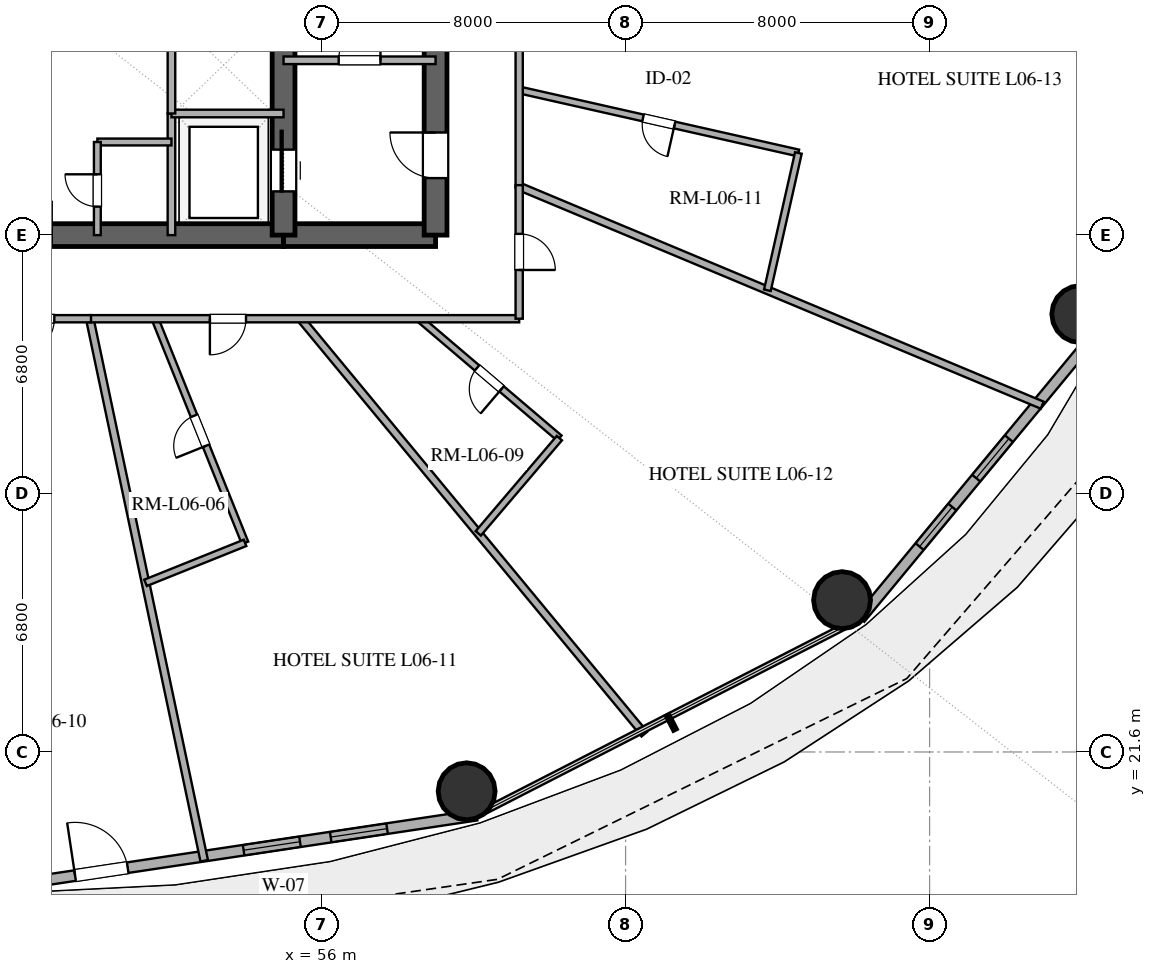
"""IFC4 building model, lengths in metres.
Left out: names, types, materials, properties, quantities, classifications, styles, units other than length and angle.
Written with IfcOpenShell. Run it as: python <this file> out.ifc"""

import sys

from ifc_helpers import new_model, si_unit, direction, frame, frame_2d, origin, origin_2d, place, context, subcontext, project, spatial, rectangle, hollow_circle, extrude, element, fill, save


model = new_model("IFC4")
c1 = context("Model", 3, precision=1e-05, world=origin(), true_north=direction((0.0, 1.0)))
c2 = subcontext(c1, "Body", "Model", "MODEL_VIEW")
j1 = project(units=[si_unit("LENGTHUNIT", "METRE"), si_unit("PLANEANGLEUNIT", "RADIAN")], contexts=[c1])
p1 = place(None, origin())
s1 = spatial("IfcSite", under=j1, at=p1, CompositionType="ELEMENT")
p2 = place(p1, origin())
s2 = spatial("IfcBuilding", under=s1, at=p2, CompositionType="ELEMENT")
p3 = place(p2, frame((0.0, 0.0, 31.8)))
s3 = spatial("IfcBuildingStorey", under=s2, at=p3, CompositionType="ELEMENT", Elevation=31.8)
p4 = place(p3, frame((41.0, 35.2, 0.0), z_axis=(0.0, 0.0, 1.0), x_axis=(1.0, 0.0, 0.0)))
e1 = element("IfcWall", 1, at=p4, inside=s3, PredefinedType="SHEAR", context=c2, shape_type="SweptSolid", body=[
    extrude(rectangle(XDim=14.0, YDim=0.6, at=frame_2d((7.0, 0.0))), origin(), (0.0, 0.0, 1.0), 3.38),
])
p5 = place(p4, frame((6.1, 0.0, 0.0)))
e2 = element("IfcOpeningElement", 2, at=p5, cuts=e1, PredefinedType="OPENING", context=c2, shape_type="SweptSolid", body=[
    extrude(rectangle(XDim=1.8, YDim=2.25, at=frame_2d((0.9, 1.125))), frame((0.0, 0.31, 0.0), z_axis=(0.0, -1.0, 0.0), x_axis=(1.0, 0.0, 0.0)), (0.0, 0.0, 1.0), 0.62),
])
p6 = place(p3, frame((55.0, 35.2, 0.0), z_axis=(0.0, 0.0, 1.0), x_axis=(1.0, 0.0, 0.0)))
e3 = element("IfcWall", 3, at=p6, inside=s3, PredefinedType="SHEAR", context=c2, shape_type="SweptSolid", body=[
    extrude(rectangle(XDim=4.0, YDim=0.6, at=frame_2d((2.0, 0.0))), origin(), (0.0, 0.0, 1.0), 3.38),
])
p7 = place(p3, frame((59.0, 35.2, 0.0), z_axis=(0.0, 0.0, 1.0), x_axis=(0.0, 1.0, 0.0)))
e4 = element("IfcWall", 4, at=p7, inside=s3, PredefinedType="SHEAR", context=c2, shape_type="SweptSolid", body=[
    extrude(rectangle(XDim=13.6, YDim=0.6, at=frame_2d((6.8, 0.0))), origin(), (0.0, 0.0, 1.0), 3.38),
])
p8 = place(p7, frame((1.5, 0.0, 0.0)))
e5 = element("IfcOpeningElement", 5, at=p8, cuts=e4, PredefinedType="OPENING", context=c2, shape_type="SweptSolid", body=[
    extrude(rectangle(XDim=1.2, YDim=2.15, at=frame_2d((0.6, 1.075))), frame((0.0, 0.31, 0.0), z_axis=(0.0, -1.0, 0.0), x_axis=(1.0, 0.0, 0.0)), (0.0, 0.0, 1.0), 0.62),
])
p9 = place(p3, frame((55.0, 35.2, 0.0), z_axis=(0.0, 0.0, 1.0), x_axis=(0.0, 1.0, 0.0)))
e6 = element("IfcWall", 6, at=p9, inside=s3, PredefinedType="SHEAR", context=c2, shape_type="SweptSolid", body=[
    extrude(rectangle(XDim=13.6, YDim=0.6, at=frame_2d((6.8, 0.0))), origin(), (0.0, 0.0, 1.0), 3.38),
])
p10 = place(p9, frame((1.15, 0.0, 0.0)))
e7 = element("IfcOpeningElement", 7, at=p10, cuts=e6, PredefinedType="OPENING", context=c2, shape_type="SweptSolid", body=[
    extrude(rectangle(XDim=1.1, YDim=2.2, at=frame_2d((0.55, 1.1))), frame((0.0, 0.31, 0.0), z_axis=(0.0, -1.0, 0.0), x_axis=(1.0, 0.0, 0.0)), (0.0, 0.0, 1.0), 0.62),
])
for number, where, z_axis, x_axis in (
    (8, (59.818, 20.566, 0.0), (0.0, 0.0, 1.0), (1.0, 0.0, 0.0)),
    (9, (69.697, 25.595, 0.0), (0.0, 0.0, 1.0), (1.0, 0.0, 0.0)),
    (10, (75.966, 33.122, 0.0), (0.0, 0.0, 1.0), (1.0, 0.0, 0.0)),
):
    element("IfcColumn", number, at=place(p3, frame(where, z_axis=z_axis, x_axis=x_axis)), inside=s3, PredefinedType="COLUMN", context=c2, shape_type="SweptSolid", body=[
        extrude(hollow_circle(Radius=0.75, WallThickness=0.04, at=origin_2d()), origin(), (0.0, 0.0, 1.0), 3.38),
    ])
p11 = place(p3, frame((48.0, 18.12, 0.0), z_axis=(0.0, 0.0, 1.0), x_axis=(0.988864835849, 0.148816452121, 0.0)))
e11 = element("IfcWall", 11, at=p11, inside=s3, PredefinedType="SOLIDWALL", context=c2, shape_type="SweptSolid", body=[
    extrude(rectangle(XDim=12.214, YDim=0.28, at=frame_2d((6.107, 0.0))), origin(), (0.0, 0.0, 1.0), 3.38),
])
p12 = place(p11, frame((1.531, 0.0, 0.0)))
e12 = element("IfcOpeningElement", 12, at=p12, cuts=e11, PredefinedType="OPENING", context=c2, shape_type="SweptSolid", body=[
    extrude(rectangle(XDim=1.4, YDim=2.2, at=frame_2d((0.7, 1.1))), frame((0.0, 0.15, 0.0), z_axis=(0.0, -1.0, 0.0), x_axis=(1.0, 0.0, 0.0)), (0.0, 0.0, 1.0), 0.3),
])
p13 = place(p11, frame((6.016, 0.0, 0.85)))
e13 = element("IfcOpeningElement", 13, at=p13, cuts=e11, PredefinedType="OPENING", context=c2, shape_type="SweptSolid", body=[
    extrude(rectangle(XDim=1.5, YDim=1.8, at=frame_2d((0.75, 0.9))), frame((0.0, 0.15, 0.0), z_axis=(0.0, -1.0, 0.0), x_axis=(1.0, 0.0, 0.0)), (0.0, 0.0, 1.0), 0.3),
])
p14 = place(p11, frame((8.333, 0.0, 0.85)))
e14 = element("IfcOpeningElement", 14, at=p14, cuts=e11, PredefinedType="OPENING", context=c2, shape_type="SweptSolid", body=[
    extrude(rectangle(XDim=1.5, YDim=1.8, at=frame_2d((0.75, 0.9))), frame((0.0, 0.15, 0.0), z_axis=(0.0, -1.0, 0.0), x_axis=(1.0, 0.0, 0.0)), (0.0, 0.0, 1.0), 0.3),
])
p15 = place(p3, frame((70.174, 25.114, 0.0), z_axis=(0.0, 0.0, 1.0), x_axis=(0.637296809613, 0.770618437657, 0.0)))
e15 = element("IfcWall", 15, at=p15, inside=s3, PredefinedType="SOLIDWALL", context=c2, shape_type="SweptSolid", body=[
    extrude(rectangle(XDim=10.053, YDim=0.28, at=frame_2d((5.027, 0.0))), origin(), (0.0, 0.0, 1.0), 3.38),
])
p16 = place(p15, frame((2.453, 0.0, 0.85)))
e16 = element("IfcOpeningElement", 16, at=p16, cuts=e15, PredefinedType="OPENING", context=c2, shape_type="SweptSolid", body=[
    extrude(rectangle(XDim=1.35, YDim=1.8, at=frame_2d((0.675, 0.9))), frame((0.0, 0.15, 0.0), z_axis=(0.0, -1.0, 0.0), x_axis=(1.0, 0.0, 0.0)), (0.0, 0.0, 1.0), 0.3),
])
p17 = place(p15, frame((4.789, 0.0, 0.85)))
e17 = element("IfcOpeningElement", 17, at=p17, cuts=e15, PredefinedType="OPENING", context=c2, shape_type="SweptSolid", body=[
    extrude(rectangle(XDim=1.35, YDim=1.8, at=frame_2d((0.675, 0.9))), frame((0.0, 0.15, 0.0), z_axis=(0.0, -1.0, 0.0), x_axis=(1.0, 0.0, 0.0)), (0.0, 0.0, 1.0), 0.3),
])
p18 = place(p3, frame((55.0, 39.8, 0.0), z_axis=(0.0, 0.0, 1.0), x_axis=(1.0, 0.0, 0.0)))
e18 = element("IfcWall", 18, at=p18, inside=s3, PredefinedType="SOLIDWALL", context=c2, shape_type="SweptSolid", body=[
    extrude(rectangle(XDim=4.0, YDim=0.2, at=frame_2d((2.0, 0.0))), origin(), (0.0, 0.0, 1.0), 2.74),
])
p19 = place(p18, frame((1.45, 0.0, 0.0)))
e19 = element("IfcOpeningElement", 19, at=p19, cuts=e18, PredefinedType="OPENING", context=c2, shape_type="SweptSolid", body=[
    extrude(rectangle(XDim=1.1, YDim=2.15, at=frame_2d((0.55, 1.075))), frame((0.0, 0.11, 0.0), z_axis=(0.0, -1.0, 0.0), x_axis=(1.0, 0.0, 0.0)), (0.0, 0.0, 1.0), 0.22),
])
p20 = place(p3, frame((52.05, 35.2, 0.0), z_axis=(0.0, 0.0, 1.0), x_axis=(0.0, 1.0, 0.0)))
e20 = element("IfcWall", 20, at=p20, inside=s3, PredefinedType="SOLIDWALL", context=c2, shape_type="SweptSolid", body=[
    extrude(rectangle(XDim=3.2, YDim=0.2, at=frame_2d((1.6, 0.0))), origin(), (0.0, 0.0, 1.0), 2.74),
])
p21 = place(p3, frame((52.05, 38.4, 0.0), z_axis=(0.0, 0.0, 1.0), x_axis=(1.0, 0.0, 0.0)))
e21 = element("IfcWall", 21, at=p21, inside=s3, PredefinedType="SOLIDWALL", context=c2, shape_type="SweptSolid", body=[
    extrude(rectangle(XDim=2.95, YDim=0.2, at=frame_2d((1.475, 0.0))), origin(), (0.0, 0.0, 1.0), 2.74),
])
p22 = place(p3, frame((52.05, 38.4, 0.0), z_axis=(0.0, 0.0, 1.0), x_axis=(0.0, 1.0, 0.0)))
e22 = element("IfcWall", 22, at=p22, inside=s3, PredefinedType="SOLIDWALL", context=c2, shape_type="SweptSolid", body=[
    extrude(rectangle(XDim=10.4, YDim=0.2, at=frame_2d((5.2, 0.0))), origin(), (0.0, 0.0, 1.0), 2.74),
])
p23 = place(p22, frame((8.2, 0.0, 0.0)))
e23 = element("IfcOpeningElement", 23, at=p23, cuts=e22, PredefinedType="OPENING", context=c2, shape_type="SweptSolid", body=[
    extrude(rectangle(XDim=1.2, YDim=2.2, at=frame_2d((0.6, 1.1))), frame((0.0, 0.11, 0.0), z_axis=(0.0, -1.0, 0.0), x_axis=(1.0, 0.0, 0.0)), (0.0, 0.0, 1.0), 0.22),
])
p24 = place(p3, frame((50.1, 37.65, 0.0), z_axis=(0.0, 0.0, 1.0), x_axis=(1.0, 0.0, 0.0)))
e24 = element("IfcWall", 24, at=p24, inside=s3, PredefinedType="PLUMBINGWALL", context=c2, shape_type="SweptSolid", body=[
    extrude(rectangle(XDim=1.95, YDim=0.18, at=frame_2d((0.975, 0.0))), origin(), (0.0, 0.0, 1.0), 2.74),
])
p25 = place(p3, frame((50.1, 35.2, 0.0), z_axis=(0.0, 0.0, 1.0), x_axis=(0.0, 1.0, 0.0)))
e25 = element("IfcWall", 25, at=p25, inside=s3, PredefinedType="PLUMBINGWALL", context=c2, shape_type="SweptSolid", body=[
    extrude(rectangle(XDim=2.45, YDim=0.18, at=frame_2d((1.225, 0.0))), origin(), (0.0, 0.0, 1.0), 2.74),
])
p26 = place(p25, frame((0.75, 0.0, 0.0)))
e26 = element("IfcOpeningElement", 26, at=p26, cuts=e25, PredefinedType="OPENING", context=c2, shape_type="SweptSolid", body=[
    extrude(rectangle(XDim=0.85, YDim=2.1, at=frame_2d((0.425, 1.05))), frame((0.0, 0.1, 0.0), z_axis=(0.0, -1.0, 0.0), x_axis=(1.0, 0.0, 0.0)), (0.0, 0.0, 1.0), 0.2),
])
p27 = place(p3, frame((61.2, 36.48, 0.0), z_axis=(0.0, 0.0, 1.0), x_axis=(0.922585702004, -0.385792201136, 0.0)))
e27 = element("IfcWall", 27, at=p27, inside=s3, PredefinedType="PARTITIONING", context=c2, shape_type="SweptSolid", body=[
    extrude(rectangle(XDim=14.918, YDim=0.2, at=frame_2d((7.459, 0.0))), origin(), (0.0, 0.0, 1.0), 2.74),
])
p28 = place(p3, frame((68.547, 37.361, 0.0), z_axis=(0.0, 0.0, 1.0), x_axis=(-0.975442349969, 0.220254902072, 0.0)))
e28 = element("IfcWall", 28, at=p28, inside=s3, PredefinedType="PLUMBINGWALL", context=c2, shape_type="SweptSolid", body=[
    extrude(rectangle(XDim=7.532, YDim=0.18, at=frame_2d((3.766, 0.0))), origin(), (0.0, 0.0, 1.0), 2.74),
])
p29 = place(p28, frame((3.341, 0.0, 0.0)))
e29 = element("IfcOpeningElement", 29, at=p29, cuts=e28, PredefinedType="OPENING", context=c2, shape_type="SweptSolid", body=[
    extrude(rectangle(XDim=0.85, YDim=2.1, at=frame_2d((0.425, 1.05))), frame((0.0, 0.1, 0.0), z_axis=(0.0, -1.0, 0.0), x_axis=(1.0, 0.0, 0.0)), (0.0, 0.0, 1.0), 0.2),
])
p30 = place(p3, frame((49.9, 33.0, 0.0), z_axis=(0.0, 0.0, 1.0), x_axis=(0.206598790959, -0.97842574556, 0.0)))
e30 = element("IfcWall", 30, at=p30, inside=s3, PredefinedType="PARTITIONING", context=c2, shape_type="SweptSolid", body=[
    extrude(rectangle(XDim=14.576, YDim=0.2, at=frame_2d((7.288, 0.0))), origin(), (0.0, 0.0, 1.0), 2.74),
])
p31 = place(p3, frame((61.2, 51.0, 0.0), z_axis=(0.0, 0.0, 1.0), x_axis=(0.0, -1.0, 0.0)))
e31 = element("IfcWall", 31, at=p31, inside=s3, PredefinedType="PARTITIONING", context=c2, shape_type="SweptSolid", body=[
    extrude(rectangle(XDim=14.554, YDim=0.19, at=frame_2d((7.277, 0.0))), origin(), (0.0, 0.0, 1.0), 2.74),
])
p32 = place(p31, frame((3.684, 0.0, 0.0)))
e32 = element("IfcOpeningElement", 32, at=p32, cuts=e31, PredefinedType="OPENING", context=c2, shape_type="SweptSolid", body=[
    extrude(rectangle(XDim=1.0, YDim=2.2, at=frame_2d((0.5, 1.1))), frame((0.0, 0.105, 0.0), z_axis=(0.0, -1.0, 0.0), x_axis=(1.0, 0.0, 0.0)), (0.0, 0.0, 1.0), 0.21),
])
p33 = place(p31, frame((9.438, 0.0, 0.0)))
e33 = element("IfcOpeningElement", 33, at=p33, cuts=e31, PredefinedType="OPENING", context=c2, shape_type="SweptSolid", body=[
    extrude(rectangle(XDim=0.95, YDim=2.15, at=frame_2d((0.475, 1.075))), frame((0.0, 0.105, 0.0), z_axis=(0.0, -1.0, 0.0), x_axis=(1.0, 0.0, 0.0)), (0.0, 0.0, 1.0), 0.21),
])
p34 = place(p3, frame((55.449, 33.0, 0.0), z_axis=(0.0, 0.0, 1.0), x_axis=(0.637638501905, -0.770335732579, 0.0)))
e34 = element("IfcWall", 34, at=p34, inside=s3, PredefinedType="PARTITIONING", context=c2, shape_type="SweptSolid", body=[
    extrude(rectangle(XDim=14.187, YDim=0.2, at=frame_2d((7.094, 0.0))), origin(), (0.0, 0.0, 1.0), 2.74),
])
p35 = place(p3, frame((53.987, 27.102, 0.0), z_axis=(0.0, 0.0, 1.0), x_axis=(-0.37285379951, 0.927890103509, 0.0)))
e35 = element("IfcWall", 35, at=p35, inside=s3, PredefinedType="PLUMBINGWALL", context=c2, shape_type="SweptSolid", body=[
    extrude(rectangle(XDim=6.356, YDim=0.18, at=frame_2d((3.178, 0.0))), origin(), (0.0, 0.0, 1.0), 2.74),
])
p36 = place(p35, frame((2.753, 0.0, 0.0)))
e36 = element("IfcOpeningElement", 36, at=p36, cuts=e35, PredefinedType="OPENING", context=c2, shape_type="SweptSolid", body=[
    extrude(rectangle(XDim=0.85, YDim=2.1, at=frame_2d((0.425, 1.05))), frame((0.0, 0.1, 0.0), z_axis=(0.0, -1.0, 0.0), x_axis=(1.0, 0.0, 0.0)), (0.0, 0.0, 1.0), 0.2),
])
p37 = place(p3, frame((62.258, 29.859, 0.0), z_axis=(0.0, 0.0, 1.0), x_axis=(-0.761358380859, 0.648331254758, 0.0)))
e37 = element("IfcWall", 37, at=p37, inside=s3, PredefinedType="PLUMBINGWALL", context=c2, shape_type="SweptSolid", body=[
    extrude(rectangle(XDim=4.845, YDim=0.18, at=frame_2d((2.422, 0.0))), origin(), (0.0, 0.0, 1.0), 2.74),
])
p38 = place(p37, frame((1.997, 0.0, 0.0)))
e38 = element("IfcOpeningElement", 38, at=p38, cuts=e37, PredefinedType="OPENING", context=c2, shape_type="SweptSolid", body=[
    extrude(rectangle(XDim=0.85, YDim=2.1, at=frame_2d((0.425, 1.05))), frame((0.0, 0.1, 0.0), z_axis=(0.0, -1.0, 0.0), x_axis=(1.0, 0.0, 0.0)), (0.0, 0.0, 1.0), 0.2),
])
p39 = place(p3, frame((61.2, 33.0, 0.0), z_axis=(0.0, 0.0, 1.0), x_axis=(-1.0, 0.0, 0.0)))
e39 = element("IfcWall", 39, at=p39, inside=s3, PredefinedType="PARTITIONING", context=c2, shape_type="SweptSolid", body=[
    extrude(rectangle(XDim=11.3, YDim=0.19, at=frame_2d((5.65, 0.0))), origin(), (0.0, 0.0, 1.0), 2.74),
])
p40 = place(p39, frame((7.188, 0.0, 0.0)))
e40 = element("IfcOpeningElement", 40, at=p40, cuts=e39, PredefinedType="OPENING", context=c2, shape_type="SweptSolid", body=[
    extrude(rectangle(XDim=0.95, YDim=2.15, at=frame_2d((0.475, 1.075))), frame((0.0, 0.105, 0.0), z_axis=(0.0, -1.0, 0.0), x_axis=(1.0, 0.0, 0.0)), (0.0, 0.0, 1.0), 0.21),
])
p41 = place(p3, frame((67.731, 33.749, 0.0), z_axis=(0.0, 0.0, 1.0), x_axis=(0.220238608567, 0.9754460289, 0.0)))
e41 = element("IfcWall", 41, at=p41, inside=s3, PredefinedType="PLUMBINGWALL", context=c2, shape_type="SweptSolid", body=[
    extrude(rectangle(XDim=3.702, YDim=0.18, at=frame_2d((1.851, 0.0))), origin(), (0.0, 0.0, 1.0), 2.74),
])
p42 = place(p3, frame((61.2, 36.515, 0.0), z_axis=(0.0, 0.0, 1.0), x_axis=(0.0, -1.0, 0.0)))
e42 = element("IfcWall", 42, at=p42, inside=s3, PredefinedType="PARTITIONING", context=c2, shape_type="SweptSolid", body=[
    extrude(rectangle(XDim=3.515, YDim=0.19, at=frame_2d((1.758, 0.0))), origin(), (0.0, 0.0, 1.0), 2.74),
])
p43 = place(p42, frame((1.282, 0.0, 0.0)))
e43 = element("IfcOpeningElement", 43, at=p43, cuts=e42, PredefinedType="OPENING", context=c2, shape_type="SweptSolid", body=[
    extrude(rectangle(XDim=0.95, YDim=2.15, at=frame_2d((0.475, 1.075))), frame((0.0, 0.105, 0.0), z_axis=(0.0, -1.0, 0.0), x_axis=(1.0, 0.0, 0.0)), (0.0, 0.0, 1.0), 0.21),
])
p44 = place(p3, frame((60.124, 27.353, 0.0), z_axis=(0.0, 0.0, 1.0), x_axis=(0.648326357453, 0.76136255111, 0.0)))
e44 = element("IfcWall", 44, at=p44, inside=s3, PredefinedType="PLUMBINGWALL", context=c2, shape_type="SweptSolid", body=[
    extrude(rectangle(XDim=3.292, YDim=0.18, at=frame_2d((1.646, 0.0))), origin(), (0.0, 0.0, 1.0), 2.74),
])
p45 = place(p3, frame((49.933, 33.0, 0.0), z_axis=(0.0, 0.0, 1.0), x_axis=(-1.0, 0.0, 0.0)))
e45 = element("IfcWall", 45, at=p45, inside=s3, PredefinedType="PARTITIONING", context=c2, shape_type="SweptSolid", body=[
    extrude(rectangle(XDim=2.879, YDim=0.19, at=frame_2d((1.44, 0.0))), origin(), (0.0, 0.0, 1.0), 2.74),
])
p46 = place(p45, frame((0.965, 0.0, 0.0)))
e46 = element("IfcOpeningElement", 46, at=p46, cuts=e45, PredefinedType="OPENING", context=c2, shape_type="SweptSolid", body=[
    extrude(rectangle(XDim=0.95, YDim=2.15, at=frame_2d((0.475, 1.075))), frame((0.0, 0.105, 0.0), z_axis=(0.0, -1.0, 0.0), x_axis=(1.0, 0.0, 0.0)), (0.0, 0.0, 1.0), 0.21),
])
p47 = place(p3, frame((51.368, 26.05, 0.0), z_axis=(0.0, 0.0, 1.0), x_axis=(0.927890861741, 0.372851912558, 0.0)))
e47 = element("IfcWall", 47, at=p47, inside=s3, PredefinedType="PLUMBINGWALL", context=c2, shape_type="SweptSolid", body=[
    extrude(rectangle(XDim=2.822, YDim=0.18, at=frame_2d((1.411, 0.0))), origin(), (0.0, 0.0, 1.0), 2.74),
])
p48 = place(p12, origin())
e48 = element("IfcDoor", 48, at=p48, inside=s3, OperationType="SINGLE_SWING_LEFT", PredefinedType="DOOR", context=c2, shape_type="SweptSolid", body=[
    extrude(rectangle(XDim=1.4, YDim=2.2, at=frame_2d((0.7, 1.1))), frame((0.0, 0.025, 0.0), z_axis=(0.0, -1.0, 0.0), x_axis=(1.0, 0.0, 0.0)), (0.0, 0.0, 1.0), 0.05),
])
fill(e12, e48)
p49 = place(p13, origin())
e49 = element("IfcWindow", 49, at=p49, inside=s3, PartitioningType="SINGLE_PANEL", PredefinedType="WINDOW", context=c2, shape_type="SweptSolid", body=[
    extrude(rectangle(XDim=1.5, YDim=1.8, at=frame_2d((0.75, 0.9))), frame((0.0, 0.03, 0.0), z_axis=(0.0, -1.0, 0.0), x_axis=(1.0, 0.0, 0.0)), (0.0, 0.0, 1.0), 0.06),
])
fill(e13, e49)
p50 = place(p14, origin())
e50 = element("IfcWindow", 50, at=p50, inside=s3, PartitioningType="SINGLE_PANEL", PredefinedType="WINDOW", context=c2, shape_type="SweptSolid", body=[
    extrude(rectangle(XDim=1.5, YDim=1.8, at=frame_2d((0.75, 0.9))), frame((0.0, 0.03, 0.0), z_axis=(0.0, -1.0, 0.0), x_axis=(1.0, 0.0, 0.0)), (0.0, 0.0, 1.0), 0.06),
])
fill(e14, e50)
p51 = place(p16, origin())
e51 = element("IfcWindow", 51, at=p51, inside=s3, PartitioningType="SINGLE_PANEL", PredefinedType="WINDOW", context=c2, shape_type="SweptSolid", body=[
    extrude(rectangle(XDim=1.35, YDim=1.8, at=frame_2d((0.675, 0.9))), frame((0.0, 0.03, 0.0), z_axis=(0.0, -1.0, 0.0), x_axis=(1.0, 0.0, 0.0)), (0.0, 0.0, 1.0), 0.06),
])
fill(e16, e51)
p52 = place(p17, origin())
e52 = element("IfcWindow", 52, at=p52, inside=s3, PartitioningType="SINGLE_PANEL", PredefinedType="WINDOW", context=c2, shape_type="SweptSolid", body=[
    extrude(rectangle(XDim=1.35, YDim=1.8, at=frame_2d((0.675, 0.9))), frame((0.0, 0.03, 0.0), z_axis=(0.0, -1.0, 0.0), x_axis=(1.0, 0.0, 0.0)), (0.0, 0.0, 1.0), 0.06),
])
fill(e17, e52)
p53 = place(p10, origin())
e53 = element("IfcDoor", 53, at=p53, inside=s3, OperationType="SLIDING_TO_RIGHT", PredefinedType="DOOR", context=c2, shape_type="SweptSolid", body=[
    extrude(rectangle(XDim=1.1, YDim=2.2, at=frame_2d((0.55, 1.1))), frame((0.0, 0.025, 0.0), z_axis=(0.0, -1.0, 0.0), x_axis=(1.0, 0.0, 0.0)), (0.0, 0.0, 1.0), 0.05),
])
fill(e7, e53)
p54 = place(p8, origin())
e54 = element("IfcDoor", 54, at=p54, inside=s3, OperationType="SINGLE_SWING_RIGHT", PredefinedType="DOOR", context=c2, shape_type="SweptSolid", body=[
    extrude(rectangle(XDim=1.2, YDim=2.15, at=frame_2d((0.6, 1.075))), frame((0.0, 0.025, 0.0), z_axis=(0.0, -1.0, 0.0), x_axis=(1.0, 0.0, 0.0)), (0.0, 0.0, 1.0), 0.05),
])
fill(e5, e54)
p55 = place(p19, origin())
e55 = element("IfcDoor", 55, at=p55, inside=s3, OperationType="SINGLE_SWING_RIGHT", PredefinedType="DOOR", context=c2, shape_type="SweptSolid", body=[
    extrude(rectangle(XDim=1.1, YDim=2.15, at=frame_2d((0.55, 1.075))), frame((0.0, 0.025, 0.0), z_axis=(0.0, -1.0, 0.0), x_axis=(1.0, 0.0, 0.0)), (0.0, 0.0, 1.0), 0.05),
])
fill(e19, e55)
p56 = place(p26, origin())
e56 = element("IfcDoor", 56, at=p56, inside=s3, OperationType="SINGLE_SWING_RIGHT", PredefinedType="DOOR", context=c2, shape_type="SweptSolid", body=[
    extrude(rectangle(XDim=0.85, YDim=2.1, at=frame_2d((0.425, 1.05))), frame((0.0, 0.025, 0.0), z_axis=(0.0, -1.0, 0.0), x_axis=(1.0, 0.0, 0.0)), (0.0, 0.0, 1.0), 0.05),
])
fill(e26, e56)
p57 = place(p29, origin())
e57 = element("IfcDoor", 57, at=p57, inside=s3, OperationType="SINGLE_SWING_LEFT", PredefinedType="DOOR", context=c2, shape_type="SweptSolid", body=[
    extrude(rectangle(XDim=0.85, YDim=2.1, at=frame_2d((0.425, 1.05))), frame((0.0, 0.025, 0.0), z_axis=(0.0, -1.0, 0.0), x_axis=(1.0, 0.0, 0.0)), (0.0, 0.0, 1.0), 0.05),
])
fill(e29, e57)
p58 = place(p36, origin())
e58 = element("IfcDoor", 58, at=p58, inside=s3, OperationType="SINGLE_SWING_LEFT", PredefinedType="DOOR", context=c2, shape_type="SweptSolid", body=[
    extrude(rectangle(XDim=0.85, YDim=2.1, at=frame_2d((0.425, 1.05))), frame((0.0, 0.025, 0.0), z_axis=(0.0, -1.0, 0.0), x_axis=(1.0, 0.0, 0.0)), (0.0, 0.0, 1.0), 0.05),
])
fill(e36, e58)
p59 = place(p38, origin())
e59 = element("IfcDoor", 59, at=p59, inside=s3, OperationType="SINGLE_SWING_LEFT", PredefinedType="DOOR", context=c2, shape_type="SweptSolid", body=[
    extrude(rectangle(XDim=0.85, YDim=2.1, at=frame_2d((0.425, 1.05))), frame((0.0, 0.025, 0.0), z_axis=(0.0, -1.0, 0.0), x_axis=(1.0, 0.0, 0.0)), (0.0, 0.0, 1.0), 0.05),
])
fill(e38, e59)
p60 = place(p40, origin())
e60 = element("IfcDoor", 60, at=p60, inside=s3, OperationType="SINGLE_SWING_RIGHT", PredefinedType="DOOR", context=c2, shape_type="SweptSolid", body=[
    extrude(rectangle(XDim=0.95, YDim=2.15, at=frame_2d((0.475, 1.075))), frame((0.0, 0.025, 0.0), z_axis=(0.0, -1.0, 0.0), x_axis=(1.0, 0.0, 0.0)), (0.0, 0.0, 1.0), 0.05),
])
fill(e40, e60)
p61 = place(p43, origin())
e61 = element("IfcDoor", 61, at=p61, inside=s3, OperationType="SINGLE_SWING_RIGHT", PredefinedType="DOOR", context=c2, shape_type="SweptSolid", body=[
    extrude(rectangle(XDim=0.95, YDim=2.15, at=frame_2d((0.475, 1.075))), frame((0.0, 0.025, 0.0), z_axis=(0.0, -1.0, 0.0), x_axis=(1.0, 0.0, 0.0)), (0.0, 0.0, 1.0), 0.05),
])
fill(e43, e61)
p62 = place(p46, origin())
e62 = element("IfcDoor", 62, at=p62, inside=s3, OperationType="SINGLE_SWING_RIGHT", PredefinedType="DOOR", context=c2, shape_type="SweptSolid", body=[
    extrude(rectangle(XDim=0.95, YDim=2.15, at=frame_2d((0.475, 1.075))), frame((0.0, 0.025, 0.0), z_axis=(0.0, -1.0, 0.0), x_axis=(1.0, 0.0, 0.0)), (0.0, 0.0, 1.0), 0.05),
])
fill(e46, e62)
save(model, sys.argv[1])
